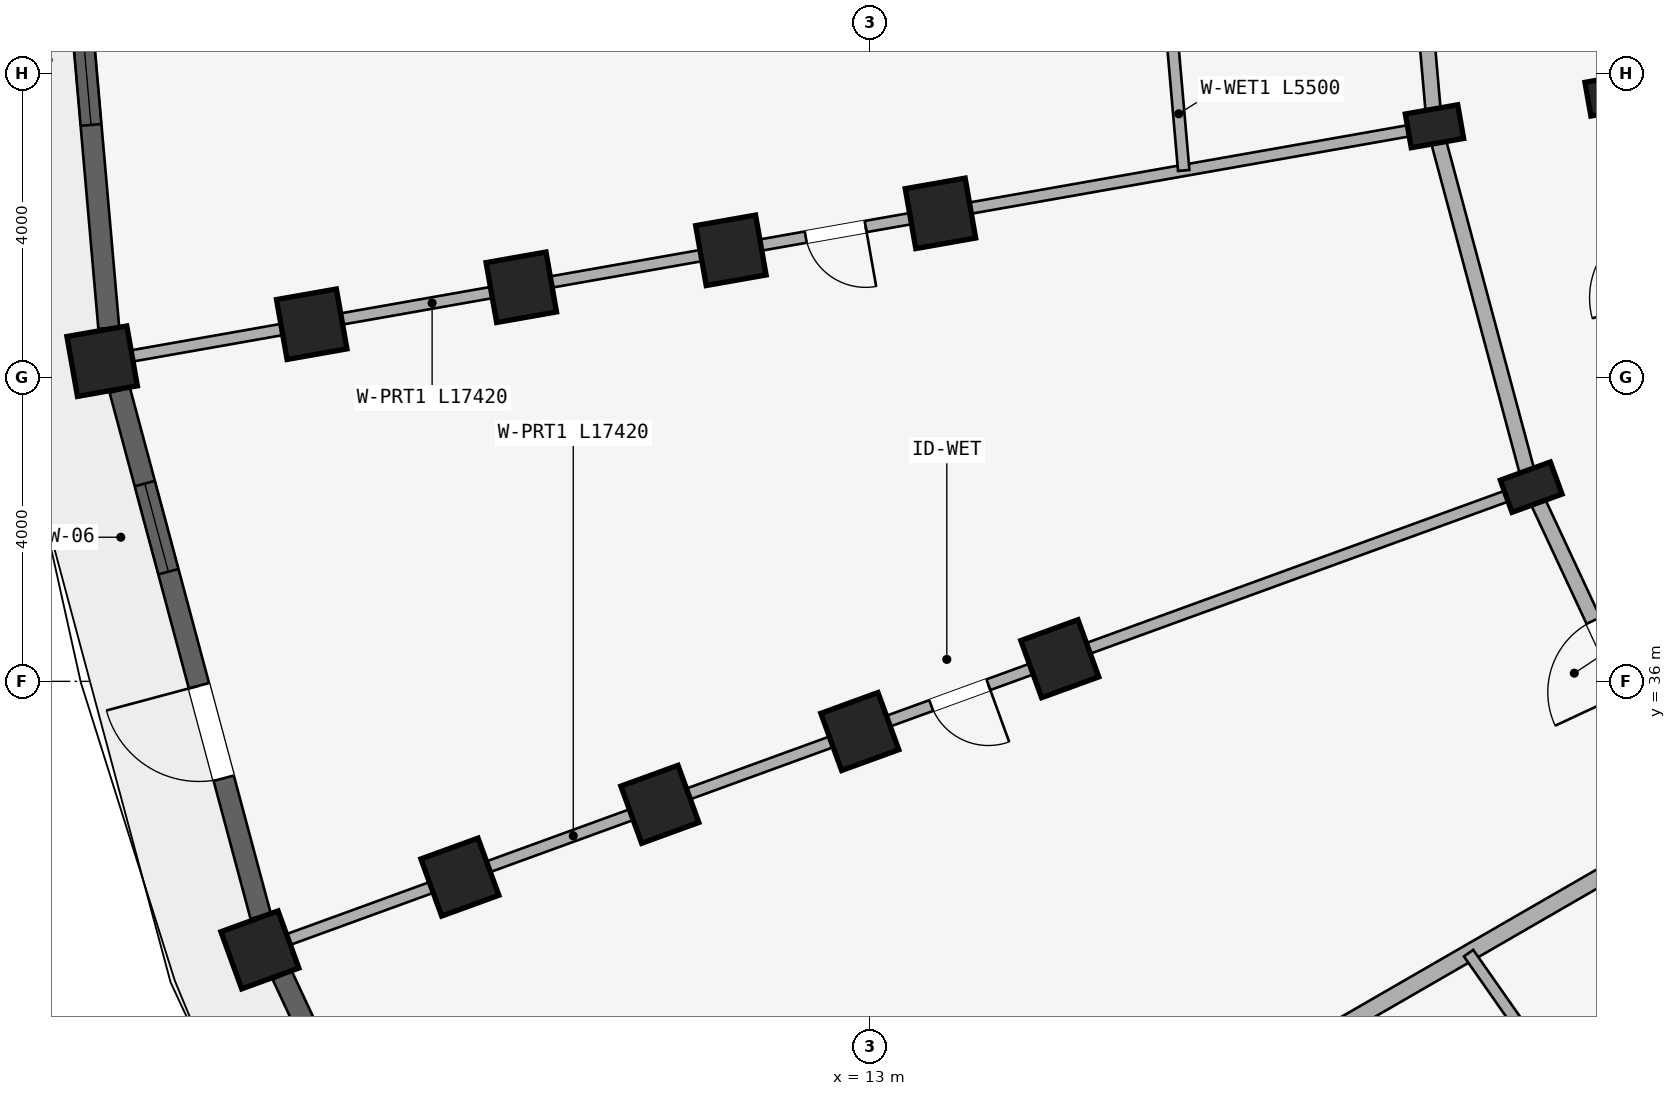
"""IFC4 building model, lengths in metres.
Left out: names, types, materials, properties, quantities, classifications, styles, units other than length and angle.
Written with IfcOpenShell. Run it as: python <this file> out.ifc"""

import sys

from ifc_helpers import new_model, si_unit, direction, frame, frame_2d, origin, origin_2d, place, context, subcontext, project, spatial, rectangle, extrude, element, fill, save


model = new_model("IFC4")
c1 = context("Model", 3, precision=1e-05, world=origin(), true_north=direction((0.0, 1.0)))
c2 = subcontext(c1, "Body", "Model", "MODEL_VIEW")
j1 = project(units=[si_unit("LENGTHUNIT", "METRE"), si_unit("PLANEANGLEUNIT", "RADIAN")], contexts=[c1])
p1 = place(None, origin())
s1 = spatial("IfcSite", under=j1, at=p1, CompositionType="ELEMENT")
p2 = place(p1, origin())
s2 = spatial("IfcBuilding", under=s1, at=p2, CompositionType="ELEMENT")
p3 = place(p2, frame((0.0, 0.0, 15.0)))
s3 = spatial("IfcBuildingStorey", under=s2, at=p3, CompositionType="ELEMENT", Elevation=15.0)
p4 = place(p3, frame((21.701, 38.555, 0.0), z_axis=(0.0, 0.0, 1.0), x_axis=(-0.342020143326, 0.939692620786, 0.0)))
e1 = element("IfcColumn", 1, at=p4, inside=s3, PredefinedType="COLUMN", context=c2, shape_type="SweptSolid", body=[
    extrude(rectangle(XDim=0.45, YDim=0.7, at=origin_2d()), origin(), (0.0, 0.0, 1.0), 2.93),
])
for number, where, z_axis, x_axis in (
    (2, (15.499, 36.298, 0.0), (0.0, 0.0, 1.0), (-0.342, 0.94, 0.0)),
    (3, (12.868, 35.34, 0.0), (0.0, 0.0, 1.0), (-0.342, 0.94, 0.0)),
    (4, (10.236, 34.382, 0.0), (0.0, 0.0, 1.0), (-0.342, 0.94, 0.0)),
    (5, (7.605, 33.425, 0.0), (0.0, 0.0, 1.0), (-0.342, 0.94, 0.0)),
    (6, (4.974, 32.467, 0.0), (0.0, 0.0, 1.0), (-0.342, 0.94, 0.0)),
):
    element("IfcColumn", number, at=place(p3, frame(where, z_axis=z_axis, x_axis=x_axis)), inside=s3, PredefinedType="COLUMN", context=c2, shape_type="SweptSolid", body=[
        extrude(rectangle(XDim=0.8, YDim=0.8, at=origin_2d()), origin(), (0.0, 0.0, 1.0), 2.93),
    ])
for number, where, z_axis, x_axis in (
    (7, (22.792, 43.72, 0.0), (0.0, 0.0, 1.0), (-0.174, 0.985, 0.0)),
    (8, (20.428, 43.303, 0.0), (0.0, 0.0, 1.0), (-0.174, 0.985, 0.0)),
):
    element("IfcColumn", number, at=place(p3, frame(where, z_axis=z_axis, x_axis=x_axis)), inside=s3, PredefinedType="COLUMN", context=c2, shape_type="SweptSolid", body=[
        extrude(rectangle(XDim=0.45, YDim=0.7, at=origin_2d()), origin(), (0.0, 0.0, 1.0), 2.93),
    ])
for number, where, z_axis, x_axis in (
    (9, (13.929, 42.157, 0.0), (0.0, 0.0, 1.0), (-0.174, 0.985, 0.0)),
    (10, (11.171, 41.671, 0.0), (0.0, 0.0, 1.0), (-0.174, 0.985, 0.0)),
    (11, (8.414, 41.185, 0.0), (0.0, 0.0, 1.0), (-0.174, 0.985, 0.0)),
    (12, (5.656, 40.698, 0.0), (0.0, 0.0, 1.0), (-0.174, 0.985, 0.0)),
    (13, (2.899, 40.212, 0.0), (0.0, 0.0, 1.0), (-0.174, 0.985, 0.0)),
):
    element("IfcColumn", number, at=place(p3, frame(where, z_axis=z_axis, x_axis=x_axis)), inside=s3, PredefinedType="COLUMN", context=c2, shape_type="SweptSolid", body=[
        extrude(rectangle(XDim=0.8, YDim=0.8, at=origin_2d()), origin(), (0.0, 0.0, 1.0), 2.93),
    ])
p5 = place(p3, frame((23.778, 34.1, 0.0), z_axis=(0.0, 0.0, 1.0), x_axis=(-0.422629854778, 0.906302381024, 0.0)))
e14 = element("IfcWall", 14, at=p5, inside=s3, PredefinedType="STANDARD", context=c2, shape_type="SweptSolid", body=[
    extrude(rectangle(XDim=4.915, YDim=0.2, at=frame_2d((2.458, 0.0))), origin(), (0.0, 0.0, 1.0), 2.372),
])
p6 = place(p5, frame((1.938, 0.0, 0.0)))
e15 = element("IfcOpeningElement", 15, at=p6, cuts=e14, PredefinedType="OPENING", context=c2, shape_type="SweptSolid", body=[
    extrude(rectangle(XDim=1.04, YDim=2.15, at=frame_2d((0.52, 1.075))), frame((0.0, 0.11, 0.0), z_axis=(0.0, -1.0, 0.0), x_axis=(1.0, 0.0, 0.0)), (0.0, 0.0, 1.0), 0.22),
])
p7 = place(p3, frame((21.701, 38.555, 0.0), z_axis=(0.0, 0.0, 1.0), x_axis=(-0.258803112091, 0.965930095386, 0.0)))
e16 = element("IfcWall", 16, at=p7, inside=s3, PredefinedType="STANDARD", context=c2, shape_type="SweptSolid", body=[
    extrude(rectangle(XDim=4.916, YDim=0.2, at=frame_2d((2.458, 0.0))), origin(), (0.0, 0.0, 1.0), 2.372),
])
p8 = place(p3, frame((22.792, 43.72, 0.0), z_axis=(0.0, 0.0, 1.0), x_axis=(-0.087187153726, 0.996191949488, 0.0)))
e17 = element("IfcWall", 17, at=p8, inside=s3, PredefinedType="STANDARD", context=c2, shape_type="SweptSolid", body=[
    extrude(rectangle(XDim=4.497, YDim=0.2, at=frame_2d((2.249, 0.0))), origin(), (0.0, 0.0, 1.0), 2.372),
])
p9 = place(p3, frame((20.428, 43.303, 0.0), z_axis=(0.0, 0.0, 1.0), x_axis=(-0.087167566415, 0.996193663584, 0.0)))
e18 = element("IfcWall", 18, at=p9, inside=s3, PredefinedType="STANDARD", context=c2, shape_type="SweptSolid", body=[
    extrude(rectangle(XDim=4.916, YDim=0.2, at=frame_2d((2.458, 0.0))), origin(), (0.0, 0.0, 1.0), 2.372),
])
p10 = place(p3, frame((23.691, 34.05, 0.0), z_axis=(0.0, 0.0, 1.0), x_axis=(-0.866026648973, -0.499997843263, 0.0)))
e19 = element("IfcWall", 19, at=p10, inside=s3, PredefinedType="STANDARD", context=c2, shape_type="SweptSolid", body=[
    extrude(rectangle(XDim=17.42, YDim=0.22, at=frame_2d((8.71, 0.0))), origin(), (0.0, 0.0, 1.0), 2.372),
])
p11 = place(p3, frame((21.607, 38.521, 0.0), z_axis=(0.0, 0.0, 1.0), x_axis=(-0.939691901159, -0.342022120477, 0.0)))
e20 = element("IfcWall", 20, at=p11, inside=s3, PredefinedType="PARTITIONING", context=c2, shape_type="SweptSolid", body=[
    extrude(rectangle(XDim=17.42, YDim=0.15, at=frame_2d((8.71, 0.0))), origin(), (0.0, 0.0, 1.0), 2.372),
])
p12 = place(p11, frame((7.5, 0.0, 0.0)))
e21 = element("IfcOpeningElement", 21, at=p12, cuts=e20, PredefinedType="OPENING", context=c2, shape_type="SweptSolid", body=[
    extrude(rectangle(XDim=0.8, YDim=2.1, at=frame_2d((0.4, 1.05))), frame((0.0, 0.085, 0.0), z_axis=(0.0, -1.0, 0.0), x_axis=(1.0, 0.0, 0.0)), (0.0, 0.0, 1.0), 0.17),
])
p13 = place(p3, frame((20.33, 43.286, 0.0), z_axis=(0.0, 0.0, 1.0), x_axis=(-0.984808098809, -0.173646216546, 0.0)))
e22 = element("IfcWall", 22, at=p13, inside=s3, PredefinedType="PARTITIONING", context=c2, shape_type="SweptSolid", body=[
    extrude(rectangle(XDim=17.42, YDim=0.15, at=frame_2d((8.71, 0.0))), origin(), (0.0, 0.0, 1.0), 2.372),
])
p14 = place(p13, frame((7.5, 0.0, 0.0)))
e23 = element("IfcOpeningElement", 23, at=p14, cuts=e22, PredefinedType="OPENING", context=c2, shape_type="SweptSolid", body=[
    extrude(rectangle(XDim=0.8, YDim=2.1, at=frame_2d((0.4, 1.05))), frame((0.0, 0.085, 0.0), z_axis=(0.0, -1.0, 0.0), x_axis=(1.0, 0.0, 0.0)), (0.0, 0.0, 1.0), 0.17),
])
p15 = place(p3, frame((24.031, 27.92, 0.0), z_axis=(0.0, 0.0, 1.0), x_axis=(-0.573569599955, 0.819156831143, 0.0)))
e24 = element("IfcWall", 24, at=p15, inside=s3, PredefinedType="PLUMBINGWALL", context=c2, shape_type="SweptSolid", body=[
    extrude(rectangle(XDim=5.5, YDim=0.15, at=frame_2d((2.75, 0.0))), origin(), (0.0, 0.0, 1.0), 2.372),
])
p16 = place(p15, frame((2.35, 0.0, 0.0)))
e25 = element("IfcOpeningElement", 25, at=p16, cuts=e24, PredefinedType="OPENING", context=c2, shape_type="SweptSolid", body=[
    extrude(rectangle(XDim=0.8, YDim=2.1, at=frame_2d((0.4, 1.05))), frame((0.0, 0.085, 0.0), z_axis=(0.0, -1.0, 0.0), x_axis=(1.0, 0.0, 0.0)), (0.0, 0.0, 1.0), 0.17),
])
p17 = place(p3, frame((17.129, 42.721, 0.0), z_axis=(0.0, 0.0, 1.0), x_axis=(-0.087188978393, 0.996191789791, 0.0)))
e26 = element("IfcWall", 26, at=p17, inside=s3, PredefinedType="PLUMBINGWALL", context=c2, shape_type="SweptSolid", body=[
    extrude(rectangle(XDim=5.5, YDim=0.15, at=frame_2d((2.75, 0.0))), origin(), (0.0, 0.0, 1.0), 2.372),
])
p18 = place(p17, frame((2.35, 0.0, 0.0)))
e27 = element("IfcOpeningElement", 27, at=p18, cuts=e26, PredefinedType="OPENING", context=c2, shape_type="SweptSolid", body=[
    extrude(rectangle(XDim=0.8, YDim=2.1, at=frame_2d((0.4, 1.05))), frame((0.0, 0.085, 0.0), z_axis=(0.0, -1.0, 0.0), x_axis=(1.0, 0.0, 0.0)), (0.0, 0.0, 1.0), 0.17),
])
p19 = place(p3, frame((8.296, 25.64, 0.0), z_axis=(0.0, 0.0, 1.0), x_axis=(-0.422633596215, 0.906300636296, 0.0)))
e28 = element("IfcWall", 28, at=p19, inside=s3, PredefinedType="STANDARD", context=c2, shape_type="SweptSolid", body=[
    extrude(rectangle(XDim=7.164, YDim=0.275, at=frame_2d((3.582, 0.0))), origin(), (0.0, 0.0, 1.0), 2.472),
])
p20 = place(p19, frame((2.532, 0.0, 0.472)))
e29 = element("IfcOpeningElement", 29, at=p20, cuts=e28, PredefinedType="OPENING", context=c2, shape_type="SweptSolid", body=[
    extrude(rectangle(XDim=2.1, YDim=1.8, at=frame_2d((1.05, 0.9))), frame((0.0, 0.147, 0.0), z_axis=(0.0, -1.0, 0.0), x_axis=(1.0, 0.0, 0.0)), (0.0, 0.0, 1.0), 0.295),
])
p21 = place(p3, frame((4.984, 32.912, 0.0), z_axis=(0.0, 0.0, 1.0), x_axis=(-0.258826933296, 0.965923712619, 0.0)))
e30 = element("IfcWall", 30, at=p21, inside=s3, PredefinedType="STANDARD", context=c2, shape_type="SweptSolid", body=[
    extrude(rectangle(XDim=7.164, YDim=0.275, at=frame_2d((3.582, 0.0))), origin(), (0.0, 0.0, 1.0), 2.472),
])
p22 = place(p21, frame((4.69, 0.0, 0.422)))
e31 = element("IfcOpeningElement", 31, at=p22, cuts=e30, PredefinedType="OPENING", context=c2, shape_type="SweptSolid", body=[
    extrude(rectangle(XDim=1.2, YDim=1.5, at=frame_2d((0.6, 0.75))), frame((0.0, 0.147, 0.0), z_axis=(0.0, -1.0, 0.0), x_axis=(1.0, 0.0, 0.0)), (0.0, 0.0, 1.0), 0.295),
])
p23 = place(p21, frame((1.877, 0.0, 0.0)))
e32 = element("IfcOpeningElement", 32, at=p23, cuts=e30, PredefinedType="OPENING", context=c2, shape_type="SweptSolid", body=[
    extrude(rectangle(XDim=1.26, YDim=2.15, at=frame_2d((0.63, 1.075))), frame((0.0, 0.147, 0.0), z_axis=(0.0, -1.0, 0.0), x_axis=(1.0, 0.0, 0.0)), (0.0, 0.0, 1.0), 0.295),
])
p24 = place(p3, frame((2.986, 40.649, 0.0), z_axis=(0.0, 0.0, 1.0), x_axis=(-0.08713989423, 0.99619608453, 0.0)))
e33 = element("IfcWall", 33, at=p24, inside=s3, PredefinedType="STANDARD", context=c2, shape_type="SweptSolid", body=[
    extrude(rectangle(XDim=7.164, YDim=0.275, at=frame_2d((3.582, 0.0))), origin(), (0.0, 0.0, 1.0), 2.472),
])
p25 = place(p24, frame((2.682, 0.0, 0.622)))
e34 = element("IfcOpeningElement", 34, at=p25, cuts=e33, PredefinedType="OPENING", context=c2, shape_type="SweptSolid", body=[
    extrude(rectangle(XDim=1.8, YDim=1.65, at=frame_2d((0.9, 0.825))), frame((0.0, 0.147, 0.0), z_axis=(0.0, -1.0, 0.0), x_axis=(1.0, 0.0, 0.0)), (0.0, 0.0, 1.0), 0.295),
])
p26 = place(p22, origin())
e35 = element("IfcWindow", 35, at=p26, inside=s3, PartitioningType="SINGLE_PANEL", PredefinedType="WINDOW", context=c2, shape_type="SweptSolid", body=[
    extrude(rectangle(XDim=1.2, YDim=1.5, at=frame_2d((0.6, 0.75))), frame((0.0, 0.03, 0.0), z_axis=(0.0, -1.0, 0.0), x_axis=(1.0, 0.0, 0.0)), (0.0, 0.0, 1.0), 0.06),
])
fill(e31, e35)
p27 = place(p25, origin())
e36 = element("IfcWindow", 36, at=p27, inside=s3, PartitioningType="DOUBLE_PANEL_VERTICAL", PredefinedType="WINDOW", context=c2, shape_type="SweptSolid", body=[
    extrude(rectangle(XDim=1.8, YDim=1.65, at=frame_2d((0.9, 0.825))), frame((0.0, 0.03, 0.0), z_axis=(0.0, -1.0, 0.0), x_axis=(1.0, 0.0, 0.0)), (0.0, 0.0, 1.0), 0.06),
])
fill(e34, e36)
p28 = place(p12, origin())
e37 = element("IfcDoor", 37, at=p28, inside=s3, OperationType="SINGLE_SWING_LEFT", PredefinedType="DOOR", context=c2, shape_type="SweptSolid", body=[
    extrude(rectangle(XDim=0.8, YDim=2.1, at=frame_2d((0.4, 1.05))), frame((0.0, 0.025, 0.0), z_axis=(0.0, -1.0, 0.0), x_axis=(1.0, 0.0, 0.0)), (0.0, 0.0, 1.0), 0.05),
])
fill(e21, e37)
p29 = place(p14, frame((0.8, 0.0, 0.0), z_axis=(0.0, 0.0, 1.0), x_axis=(-1.0, 0.0, 0.0)))
e38 = element("IfcDoor", 38, at=p29, inside=s3, OperationType="SINGLE_SWING_RIGHT", PredefinedType="DOOR", context=c2, shape_type="SweptSolid", body=[
    extrude(rectangle(XDim=0.8, YDim=2.1, at=frame_2d((0.4, 1.05))), frame((0.0, 0.025, 0.0), z_axis=(0.0, -1.0, 0.0), x_axis=(1.0, 0.0, 0.0)), (0.0, 0.0, 1.0), 0.05),
])
fill(e23, e38)
p30 = place(p6, frame((1.04, 0.0, 0.0), z_axis=(0.0, 0.0, 1.0), x_axis=(-1.0, 0.0, 0.0)))
e39 = element("IfcDoor", 39, at=p30, inside=s3, OperationType="SINGLE_SWING_RIGHT", PredefinedType="DOOR", context=c2, shape_type="SweptSolid", body=[
    extrude(rectangle(XDim=1.04, YDim=2.15, at=frame_2d((0.52, 1.075))), frame((0.0, 0.025, 0.0), z_axis=(0.0, -1.0, 0.0), x_axis=(1.0, 0.0, 0.0)), (0.0, 0.0, 1.0), 0.05),
])
fill(e15, e39)
p31 = place(p23, origin())
e40 = element("IfcDoor", 40, at=p31, inside=s3, OperationType="SINGLE_SWING_RIGHT", PredefinedType="DOOR", context=c2, shape_type="SweptSolid", body=[
    extrude(rectangle(XDim=1.26, YDim=2.15, at=frame_2d((0.63, 1.075))), frame((0.0, 0.025, 0.0), z_axis=(0.0, -1.0, 0.0), x_axis=(1.0, 0.0, 0.0)), (0.0, 0.0, 1.0), 0.05),
])
fill(e32, e40)
save(model, sys.argv[1])
